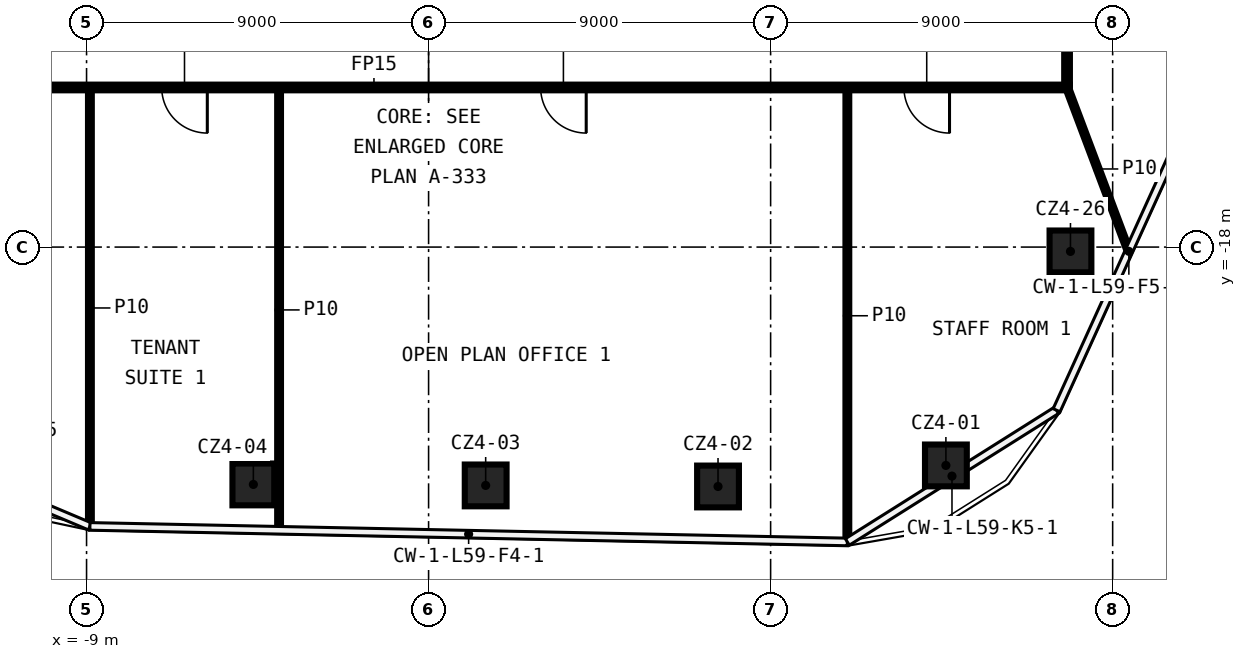
"""IFC4 building model, lengths in metres.
Left out: names, types, materials, properties, quantities, classifications, styles, units other than length and angle.
Written with IfcOpenShell. Run it as: python <this file> out.ifc"""

import sys

from ifc_helpers import new_model, si_unit, direction, frame, frame_2d, origin, origin_2d, place, context, subcontext, project, spatial, rectangle, extrude, element, fill, save


model = new_model("IFC4")
c1 = context("Model", 3, precision=1e-05, world=origin(), true_north=direction((0.0, 1.0)))
c2 = subcontext(c1, "Body", "Model", "MODEL_VIEW")
j1 = project(units=[si_unit("LENGTHUNIT", "METRE"), si_unit("PLANEANGLEUNIT", "RADIAN")], contexts=[c1])
p1 = place(None, origin())
s1 = spatial("IfcSite", under=j1, at=p1, CompositionType="ELEMENT")
p2 = place(p1, origin())
s2 = spatial("IfcBuilding", under=s1, at=p2, CompositionType="ELEMENT")
p3 = place(p2, frame((0.0, 0.0, 279.0)))
s3 = spatial("IfcBuildingStorey", under=s2, at=p3, CompositionType="ELEMENT", Elevation=279.0)
for number, where, z_axis, x_axis in (
    (1, (13.612, -23.746, 0.0), (0.0, 0.0, 1.0), (1.0, 0.0, 0.0)),
    (2, (7.616, -24.3, 0.0), (0.0, 0.0, 1.0), (1.0, 0.0, 0.0)),
    (3, (1.502, -24.272, 0.0), (0.0, 0.0, 1.0), (1.0, 0.0, 0.0)),
    (4, (-4.611, -24.246, 0.0), (0.0, 0.0, 1.0), (1.0, 0.0, 0.0)),
    (5, (16.89, -18.114, 0.0), (0.0, 0.0, 1.0), (1.0, 0.0, 0.0)),
):
    element("IfcColumn", number, at=place(p3, frame(where, z_axis=z_axis, x_axis=x_axis)), inside=s3, PredefinedType="COLUMN", context=c2, shape_type="SweptSolid", body=[
        extrude(rectangle(XDim=1.1, YDim=1.1, at=origin_2d()), origin(), (0.0, 0.0, 1.0), 3.6),
    ])
p4 = place(p3, frame((16.875, -13.8, 0.0), z_axis=(0.0, 0.0, 1.0), x_axis=(-1.0, 0.0, 0.0)))
e6 = element("IfcWall", 6, at=p4, inside=s3, PredefinedType="PARTITIONING", context=c2, shape_type="SweptSolid", body=[
    extrude(rectangle(XDim=28.95, YDim=0.15, at=frame_2d((14.475, 0.0))), origin(), (0.0, 0.0, 1.0), 3.6),
])
p5 = place(p4, frame((22.698, 0.0, 0.0)))
e7 = element("IfcOpeningElement", 7, at=p5, cuts=e6, PredefinedType="OPENING", context=c2, shape_type="SweptSolid", body=[
    extrude(rectangle(XDim=1.2, YDim=2.1, at=frame_2d((0.6, 1.05))), frame((0.0, 0.085, 0.0), z_axis=(0.0, -1.0, 0.0), x_axis=(1.0, 0.0, 0.0)), (0.0, 0.0, 1.0), 0.17),
])
p6 = place(p4, frame((12.727, 0.0, 0.0)))
e8 = element("IfcOpeningElement", 8, at=p6, cuts=e6, PredefinedType="OPENING", context=c2, shape_type="SweptSolid", body=[
    extrude(rectangle(XDim=1.2, YDim=2.1, at=frame_2d((0.6, 1.05))), frame((0.0, 0.085, 0.0), z_axis=(0.0, -1.0, 0.0), x_axis=(1.0, 0.0, 0.0)), (0.0, 0.0, 1.0), 0.17),
])
p7 = place(p4, frame((3.167, 0.0, 0.0)))
e9 = element("IfcOpeningElement", 9, at=p7, cuts=e6, PredefinedType="OPENING", context=c2, shape_type="SweptSolid", body=[
    extrude(rectangle(XDim=1.2, YDim=2.1, at=frame_2d((0.6, 1.05))), frame((0.0, 0.085, 0.0), z_axis=(0.0, -1.0, 0.0), x_axis=(1.0, 0.0, 0.0)), (0.0, 0.0, 1.0), 0.17),
])
p8 = place(p3, frame((16.8, 13.725, 0.0), z_axis=(0.0, 0.0, 1.0), x_axis=(0.0, -1.0, 0.0)))
e10 = element("IfcWall", 10, at=p8, inside=s3, PredefinedType="PARTITIONING", context=c2, shape_type="SweptSolid", body=[
    extrude(rectangle(XDim=27.45, YDim=0.15, at=frame_2d((13.725, 0.0))), origin(), (0.0, 0.0, 1.0), 3.6),
])
p9 = place(p8, frame((22.803, 0.0, 0.0)))
e11 = element("IfcOpeningElement", 11, at=p9, cuts=e10, PredefinedType="OPENING", context=c2, shape_type="SweptSolid", body=[
    extrude(rectangle(XDim=1.2, YDim=2.1, at=frame_2d((0.6, 1.05))), frame((0.0, 0.085, 0.0), z_axis=(0.0, -1.0, 0.0), x_axis=(1.0, 0.0, 0.0)), (0.0, 0.0, 1.0), 0.17),
])
p10 = place(p3, frame((11.019, -25.74, 0.0), z_axis=(0.0, 0.0, 1.0), x_axis=(0.0, 1.0, 0.0)))
e12 = element("IfcWall", 12, at=p10, inside=s3, PredefinedType="PARTITIONING", context=c2, shape_type="SweptSolid", body=[
    extrude(rectangle(XDim=11.865, YDim=0.1, at=frame_2d((5.932, 0.0))), origin(), (0.0, 0.0, 1.0), 3.6),
])
p11 = place(p3, frame((-3.934, -25.433, 0.0), z_axis=(0.0, 0.0, 1.0), x_axis=(0.0, 1.0, 0.0)))
e13 = element("IfcWall", 13, at=p11, inside=s3, PredefinedType="PARTITIONING", context=c2, shape_type="SweptSolid", body=[
    extrude(rectangle(XDim=11.558, YDim=0.1, at=frame_2d((5.779, 0.0))), origin(), (0.0, 0.0, 1.0), 3.6),
])
p12 = place(p3, frame((-8.912, -25.33, 0.0), z_axis=(0.0, 0.0, 1.0), x_axis=(0.0, 1.0, 0.0)))
e14 = element("IfcWall", 14, at=p12, inside=s3, PredefinedType="PARTITIONING", context=c2, shape_type="SweptSolid", body=[
    extrude(rectangle(XDim=11.455, YDim=0.1, at=frame_2d((5.728, 0.0))), origin(), (0.0, 0.0, 1.0), 3.6),
])
p13 = place(p3, frame((16.8, -13.8, 0.0), z_axis=(0.0, 0.0, 1.0), x_axis=(0.352127226584, -0.935952144235, 0.0)))
e15 = element("IfcWall", 15, at=p13, inside=s3, PredefinedType="PARTITIONING", context=c2, shape_type="SweptSolid", body=[
    extrude(rectangle(XDim=4.583, YDim=0.1, at=frame_2d((2.292, 0.0))), origin(), (0.0, 0.0, 1.0), 3.6),
])
p14 = place(p5, origin())
e16 = element("IfcDoor", 16, at=p14, inside=s3, OperationType="SINGLE_SWING_RIGHT", PredefinedType="DOOR", context=c2, shape_type="SweptSolid", body=[
    extrude(rectangle(XDim=1.2, YDim=2.1, at=frame_2d((0.6, 1.05))), frame((0.0, 0.025, 0.0), z_axis=(0.0, -1.0, 0.0), x_axis=(1.0, 0.0, 0.0)), (0.0, 0.0, 1.0), 0.05),
])
fill(e7, e16)
p15 = place(p6, origin())
e17 = element("IfcDoor", 17, at=p15, inside=s3, OperationType="SINGLE_SWING_LEFT", PredefinedType="DOOR", context=c2, shape_type="SweptSolid", body=[
    extrude(rectangle(XDim=1.2, YDim=2.1, at=frame_2d((0.6, 1.05))), frame((0.0, 0.025, 0.0), z_axis=(0.0, -1.0, 0.0), x_axis=(1.0, 0.0, 0.0)), (0.0, 0.0, 1.0), 0.05),
])
fill(e8, e17)
p16 = place(p7, origin())
e18 = element("IfcDoor", 18, at=p16, inside=s3, OperationType="SINGLE_SWING_RIGHT", PredefinedType="DOOR", context=c2, shape_type="SweptSolid", body=[
    extrude(rectangle(XDim=1.2, YDim=2.1, at=frame_2d((0.6, 1.05))), frame((0.0, 0.025, 0.0), z_axis=(0.0, -1.0, 0.0), x_axis=(1.0, 0.0, 0.0)), (0.0, 0.0, 1.0), 0.05),
])
fill(e9, e18)
save(model, sys.argv[1])
